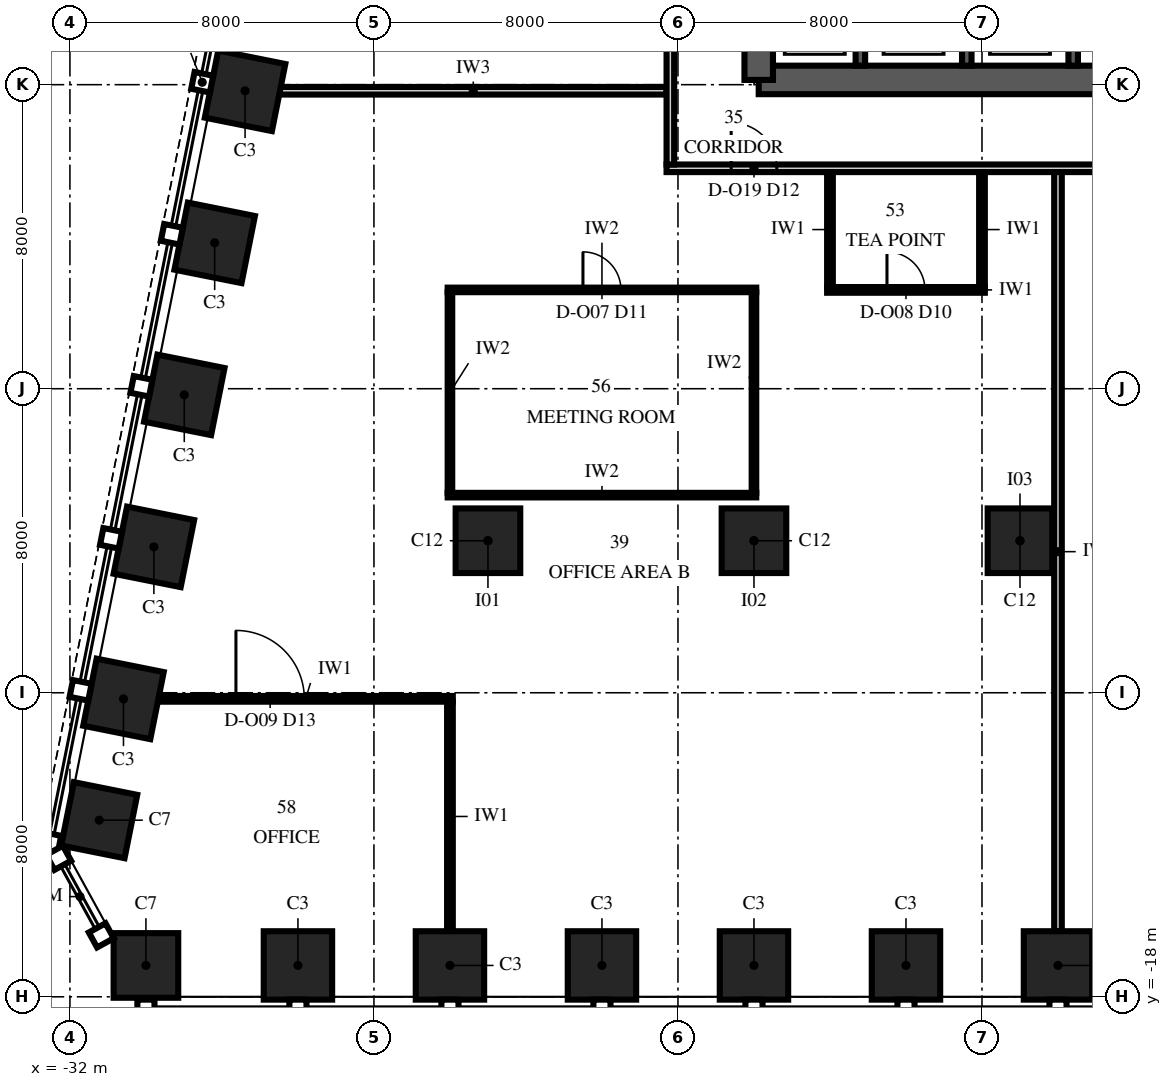
"""IFC4 building model, lengths in metres.
Left out: names, types, materials, properties, quantities, classifications, styles, units other than length and angle.
Written with IfcOpenShell. Run it as: python <this file> out.ifc"""

import sys

from ifc_helpers import new_model, si_unit, direction, frame, frame_2d, origin, origin_2d, place, context, subcontext, project, spatial, polyline, rectangle, outline, extrude, element, fill, save


model = new_model("IFC4")
c1 = context("Model", 3, precision=1e-05, world=origin(), true_north=direction((0.0, 1.0)))
c2 = subcontext(c1, "Body", "Model", "MODEL_VIEW")
j1 = project(units=[si_unit("LENGTHUNIT", "METRE"), si_unit("PLANEANGLEUNIT", "RADIAN")], contexts=[c1])
p1 = place(None, origin())
s1 = spatial("IfcSite", under=j1, at=p1, CompositionType="ELEMENT")
p2 = place(p1, origin())
s2 = spatial("IfcBuilding", under=s1, at=p2, CompositionType="ELEMENT")
p3 = place(p2, frame((0.0, 0.0, 151.0)))
s3 = spatial("IfcBuildingStorey", under=s2, at=p3, CompositionType="ELEMENT", Elevation=151.0)
p4 = place(p3, frame((-30.0, -17.175, 0.0), z_axis=(0.0, 0.0, 1.0), x_axis=(1.0, 0.0, 0.0)))
e1 = element("IfcColumn", 1, at=p4, inside=s3, PredefinedType="COLUMN", context=c2, shape_type="SweptSolid", body=[
    extrude(rectangle(XDim=1.7, YDim=1.7, at=origin_2d()), origin(), (0.0, 0.0, 1.0), 4.0),
])
for number, where, z_axis, x_axis in (
    (2, (-26.0, -17.175, 0.0), (0.0, 0.0, 1.0), (1.0, 0.0, 0.0)),
    (3, (-22.0, -17.175, 0.0), (0.0, 0.0, 1.0), (1.0, 0.0, 0.0)),
    (4, (-18.0, -17.175, 0.0), (0.0, 0.0, 1.0), (1.0, 0.0, 0.0)),
    (5, (-14.0, -17.175, 0.0), (0.0, 0.0, 1.0), (1.0, 0.0, 0.0)),
    (6, (-10.0, -17.175, 0.0), (0.0, 0.0, 1.0), (1.0, 0.0, 0.0)),
    (7, (-6.0, -17.175, 0.0), (0.0, 0.0, 1.0), (1.0, 0.0, 0.0)),
    (8, (-27.391, 5.838, 0.0), (0.0, 0.0, 1.0), (-0.196, -0.981, 0.0)),
    (9, (-28.191, 1.838, 0.0), (0.0, 0.0, 1.0), (-0.196, -0.981, 0.0)),
    (10, (-28.991, -2.162, 0.0), (0.0, 0.0, 1.0), (-0.196, -0.981, 0.0)),
    (11, (-29.791, -6.162, 0.0), (0.0, 0.0, 1.0), (-0.196, -0.981, 0.0)),
    (12, (-30.591, -10.162, 0.0), (0.0, 0.0, 1.0), (-0.196, -0.981, 0.0)),
):
    element("IfcColumn", number, at=place(p3, frame(where, z_axis=z_axis, x_axis=x_axis)), inside=s3, PredefinedType="COLUMN", context=c2, shape_type="SweptSolid", body=[
        extrude(rectangle(XDim=1.8, YDim=1.8, at=origin_2d()), origin(), (0.0, 0.0, 1.0), 4.0),
    ])
for number, where, z_axis, x_axis in (
    (13, (-31.229, -13.353, 0.0), (0.0, 0.0, 1.0), (-0.196, -0.981, 0.0)),
    (14, (-21.0, -6.0, 0.0), (0.0, 0.0, 1.0), (1.0, 0.0, 0.0)),
    (15, (-14.0, -6.0, 0.0), (0.0, 0.0, 1.0), (1.0, 0.0, 0.0)),
    (16, (-7.0, -6.0, 0.0), (0.0, 0.0, 1.0), (1.0, 0.0, 0.0)),
):
    element("IfcColumn", number, at=place(p3, frame(where, z_axis=z_axis, x_axis=x_axis)), inside=s3, PredefinedType="COLUMN", context=c2, shape_type="SweptSolid", body=[
        extrude(rectangle(XDim=1.7, YDim=1.7, at=origin_2d()), origin(), (0.0, 0.0, 1.0), 4.0),
    ])
p5 = place(p3, frame((-13.875, 6.125, 0.0), z_axis=(0.0, 0.0, 1.0), x_axis=(1.0, 0.0, 0.0)))
e17 = element("IfcWall", 17, at=p5, inside=s3, PredefinedType="SHEAR", context=c2, shape_type="SweptSolid", body=[
    extrude(rectangle(XDim=27.75, YDim=0.75, at=frame_2d((13.875, 0.0))), origin(), (0.0, 0.0, 1.0), 4.0),
])
p6 = place(p3, frame((-13.875, 23.875, 0.0), z_axis=(0.0, 0.0, 1.0), x_axis=(0.0, -1.0, 0.0)))
e18 = element("IfcWall", 18, at=p6, inside=s3, PredefinedType="SHEAR", context=c2, shape_type="SweptSolid", body=[
    extrude(outline(polyline([(0.0, -0.375), (17.75, -0.375), (17.75, 0.0), (17.375, 0.0), (17.375, 0.375), (0.375, 0.375), (0.375, 0.0), (0.0, 0.0), (0.0, -0.375)])), origin(), (0.0, 0.0, 1.0), 4.0),
])
p7 = place(p6, frame((11.775, 0.0, 0.0)))
e19 = element("IfcOpeningElement", 19, at=p7, cuts=e18, PredefinedType="OPENING", context=c2, shape_type="SweptSolid", body=[
    extrude(rectangle(XDim=1.8, YDim=2.4, at=frame_2d((0.9, 1.2))), frame((0.0, 0.39, 0.0), z_axis=(0.0, -1.0, 0.0), x_axis=(1.0, 0.0, 0.0)), (0.0, 0.0, 1.0), 0.78),
])
for number, where, z_axis, x_axis in (
    (20, (-11.2, 6.5, 0.0), (0.0, 0.0, 1.0), (0.0, 1.0, 0.0)),
    (21, (-8.4, 6.5, 0.0), (0.0, 0.0, 1.0), (0.0, 1.0, 0.0)),
    (22, (-5.6, 6.5, 0.0), (0.0, 0.0, 1.0), (0.0, 1.0, 0.0)),
):
    element("IfcWall", number, at=place(p3, frame(where, z_axis=z_axis, x_axis=x_axis)), inside=s3, PredefinedType="SHEAR", context=c2, shape_type="SweptSolid", body=[
        extrude(rectangle(XDim=2.775, YDim=0.25, at=frame_2d((1.387, 0.0))), origin(), (0.0, 0.0, 1.0), 4.0),
    ])
p8 = place(p3, frame((-29.673, -10.16, 0.0), z_axis=(0.0, 0.0, 1.0), x_axis=(1.0, 0.0, 0.0)))
e23 = element("IfcWall", 23, at=p8, inside=s3, PredefinedType="PARTITIONING", context=c2, shape_type="SweptSolid", body=[
    extrude(rectangle(XDim=7.748, YDim=0.15, at=frame_2d((3.874, 0.0))), origin(), (0.0, 0.0, 1.0), 3.25),
])
p9 = place(p8, frame((2.041, 0.0, 0.0)))
e24 = element("IfcOpeningElement", 24, at=p9, cuts=e23, PredefinedType="OPENING", context=c2, shape_type="SweptSolid", body=[
    extrude(rectangle(XDim=1.8, YDim=2.4, at=frame_2d((0.9, 1.2))), frame((0.0, 0.09, 0.0), z_axis=(0.0, -1.0, 0.0), x_axis=(1.0, 0.0, 0.0)), (0.0, 0.0, 1.0), 0.18),
])
p10 = place(p3, frame((-22.06, -4.8, 0.0), z_axis=(0.0, 0.0, 1.0), x_axis=(1.0, 0.0, 0.0)))
e25 = element("IfcWall", 25, at=p10, inside=s3, PredefinedType="PARTITIONING", context=c2, shape_type="SweptSolid", body=[
    extrude(rectangle(XDim=8.12, YDim=0.12, at=frame_2d((4.06, 0.0))), origin(), (0.0, 0.0, 1.0), 3.25),
])
p11 = place(p3, frame((-22.06, 0.6, 0.0), z_axis=(0.0, 0.0, 1.0), x_axis=(1.0, 0.0, 0.0)))
e26 = element("IfcWall", 26, at=p11, inside=s3, PredefinedType="PARTITIONING", context=c2, shape_type="SweptSolid", body=[
    extrude(rectangle(XDim=8.12, YDim=0.12, at=frame_2d((4.06, 0.0))), origin(), (0.0, 0.0, 1.0), 3.25),
])
p12 = place(p11, frame((3.56, 0.0, 0.0)))
e27 = element("IfcOpeningElement", 27, at=p12, cuts=e26, PredefinedType="OPENING", context=c2, shape_type="SweptSolid", body=[
    extrude(rectangle(XDim=1.0, YDim=2.4, at=frame_2d((0.5, 1.2))), frame((0.0, 0.075, 0.0), z_axis=(0.0, -1.0, 0.0), x_axis=(1.0, 0.0, 0.0)), (0.0, 0.0, 1.0), 0.15),
])
p13 = place(p3, frame((-12.075, 0.6, 0.0), z_axis=(0.0, 0.0, 1.0), x_axis=(1.0, 0.0, 0.0)))
e28 = element("IfcWall", 28, at=p13, inside=s3, PredefinedType="PARTITIONING", context=c2, shape_type="SweptSolid", body=[
    extrude(rectangle(XDim=4.15, YDim=0.15, at=frame_2d((2.075, 0.0))), origin(), (0.0, 0.0, 1.0), 3.25),
])
p14 = place(p13, frame((1.575, 0.0, 0.0)))
e29 = element("IfcOpeningElement", 29, at=p14, cuts=e28, PredefinedType="OPENING", context=c2, shape_type="SweptSolid", body=[
    extrude(rectangle(XDim=1.0, YDim=2.3, at=frame_2d((0.5, 1.15))), frame((0.0, 0.09, 0.0), z_axis=(0.0, -1.0, 0.0), x_axis=(1.0, 0.0, 0.0)), (0.0, 0.0, 1.0), 0.18),
])
p15 = place(p3, frame((-16.3, 3.8, 0.0), z_axis=(0.0, 0.0, 1.0), x_axis=(1.0, 0.0, 0.0)))
e30 = element("IfcWall", 30, at=p15, inside=s3, PredefinedType="PARTITIONING", context=c2, shape_type="SweptSolid", body=[
    extrude(rectangle(XDim=32.6, YDim=0.2, at=frame_2d((16.3, 0.0))), origin(), (0.0, 0.0, 1.0), 3.25),
])
p16 = place(p15, frame((1.7, 0.0, 0.0)))
e31 = element("IfcOpeningElement", 31, at=p16, cuts=e30, PredefinedType="OPENING", context=c2, shape_type="SweptSolid", body=[
    extrude(rectangle(XDim=1.2, YDim=2.4, at=frame_2d((0.6, 1.2))), frame((0.0, 0.115, 0.0), z_axis=(0.0, -1.0, 0.0), x_axis=(1.0, 0.0, 0.0)), (0.0, 0.0, 1.0), 0.23),
])
p17 = place(p15, frame((12.7, 0.0, 0.0)))
e32 = element("IfcOpeningElement", 32, at=p17, cuts=e30, PredefinedType="OPENING", context=c2, shape_type="SweptSolid", body=[
    extrude(rectangle(XDim=1.2, YDim=2.4, at=frame_2d((0.6, 1.2))), frame((0.0, 0.115, 0.0), z_axis=(0.0, -1.0, 0.0), x_axis=(1.0, 0.0, 0.0)), (0.0, 0.0, 1.0), 0.23),
])
p18 = place(p3, frame((-26.473, 5.84, 0.0), z_axis=(0.0, 0.0, 1.0), x_axis=(1.0, 0.0, 0.0)))
e33 = element("IfcWall", 33, at=p18, inside=s3, PredefinedType="PARTITIONING", context=c2, shape_type="SweptSolid", body=[
    extrude(rectangle(XDim=10.173, YDim=0.2, at=frame_2d((5.086, 0.0))), origin(), (0.0, 0.0, 1.0), 2.842),
])
p19 = place(p3, frame((-22.0, -16.275, 0.0), z_axis=(0.0, 0.0, 1.0), x_axis=(0.0, 1.0, 0.0)))
e34 = element("IfcWall", 34, at=p19, inside=s3, PredefinedType="PARTITIONING", context=c2, shape_type="SweptSolid", body=[
    extrude(rectangle(XDim=6.04, YDim=0.15, at=frame_2d((3.02, 0.0))), origin(), (0.0, 0.0, 1.0), 3.25),
])
p20 = place(p3, frame((-22.0, -4.74, 0.0), z_axis=(0.0, 0.0, 1.0), x_axis=(0.0, 1.0, 0.0)))
e35 = element("IfcWall", 35, at=p20, inside=s3, PredefinedType="PARTITIONING", context=c2, shape_type="SweptSolid", body=[
    extrude(rectangle(XDim=5.28, YDim=0.12, at=frame_2d((2.64, 0.0))), origin(), (0.0, 0.0, 1.0), 3.25),
])
p21 = place(p3, frame((-16.2, 3.9, 0.0), z_axis=(0.0, 0.0, 1.0), x_axis=(0.0, 1.0, 0.0)))
e36 = element("IfcWall", 36, at=p21, inside=s3, PredefinedType="PARTITIONING", context=c2, shape_type="SweptSolid", body=[
    extrude(rectangle(XDim=24.375, YDim=0.2, at=frame_2d((12.188, 0.0))), origin(), (0.0, 0.0, 1.0), 2.842),
])
p22 = place(p21, frame((7.5, 0.0, 0.0)))
e37 = element("IfcOpeningElement", 37, at=p22, cuts=e36, PredefinedType="OPENING", context=c2, shape_type="SweptSolid", body=[
    extrude(rectangle(XDim=1.2, YDim=2.4, at=frame_2d((0.6, 1.2))), frame((0.0, 0.115, 0.0), z_axis=(0.0, -1.0, 0.0), x_axis=(1.0, 0.0, 0.0)), (0.0, 0.0, 1.0), 0.23),
])
p23 = place(p3, frame((-14.0, -4.74, 0.0), z_axis=(0.0, 0.0, 1.0), x_axis=(0.0, 1.0, 0.0)))
e38 = element("IfcWall", 38, at=p23, inside=s3, PredefinedType="PARTITIONING", context=c2, shape_type="SweptSolid", body=[
    extrude(rectangle(XDim=5.28, YDim=0.12, at=frame_2d((2.64, 0.0))), origin(), (0.0, 0.0, 1.0), 3.25),
])
for number, where, z_axis, x_axis in (
    (39, (-12.0, 0.675, 0.0), (0.0, 0.0, 1.0), (0.0, 1.0, 0.0)),
    (40, (-8.0, 0.675, 0.0), (0.0, 0.0, 1.0), (0.0, 1.0, 0.0)),
):
    element("IfcWall", number, at=place(p3, frame(where, z_axis=z_axis, x_axis=x_axis)), inside=s3, PredefinedType="PARTITIONING", context=c2, shape_type="SweptSolid", body=[
        extrude(rectangle(XDim=3.025, YDim=0.15, at=frame_2d((1.512, 0.0))), origin(), (0.0, 0.0, 1.0), 3.85),
    ])
p24 = place(p3, frame((-6.0, -16.275, 0.0), z_axis=(0.0, 0.0, 1.0), x_axis=(0.0, 1.0, 0.0)))
e41 = element("IfcWall", 41, at=p24, inside=s3, PredefinedType="PARTITIONING", context=c2, shape_type="SweptSolid", body=[
    extrude(rectangle(XDim=19.975, YDim=0.2, at=frame_2d((9.987, 0.0))), origin(), (0.0, 0.0, 1.0), 2.842),
])
p25 = place(p12, origin())
e42 = element("IfcDoor", 42, at=p25, inside=s3, OperationType="SINGLE_SWING_RIGHT", PredefinedType="DOOR", context=c2, shape_type="SweptSolid", body=[
    extrude(rectangle(XDim=1.0, YDim=2.4, at=frame_2d((0.5, 1.2))), frame((0.0, 0.06, 0.0), z_axis=(0.0, -1.0, 0.0), x_axis=(1.0, 0.0, 0.0)), (0.0, 0.0, 1.0), 0.12),
])
fill(e27, e42)
p26 = place(p14, origin())
e43 = element("IfcDoor", 43, at=p26, inside=s3, OperationType="SINGLE_SWING_LEFT", PredefinedType="DOOR", context=c2, shape_type="SweptSolid", body=[
    extrude(rectangle(XDim=1.0, YDim=2.3, at=frame_2d((0.5, 1.15))), frame((0.0, 0.075, 0.0), z_axis=(0.0, -1.0, 0.0), x_axis=(1.0, 0.0, 0.0)), (0.0, 0.0, 1.0), 0.149),
])
fill(e29, e43)
p27 = place(p9, origin())
e44 = element("IfcDoor", 44, at=p27, inside=s3, OperationType="DOUBLE_DOOR_SINGLE_SWING", PredefinedType="DOOR", context=c2, shape_type="SweptSolid", body=[
    extrude(rectangle(XDim=1.8, YDim=2.4, at=frame_2d((0.9, 1.2))), frame((0.0, 0.075, 0.0), z_axis=(0.0, -1.0, 0.0), x_axis=(1.0, 0.0, 0.0)), (0.0, 0.0, 1.0), 0.149),
])
fill(e24, e44)
p28 = place(p16, origin())
e45 = element("IfcDoor", 45, at=p28, inside=s3, OperationType="SINGLE_SWING_LEFT", PredefinedType="DOOR", context=c2, shape_type="SweptSolid", body=[
    extrude(rectangle(XDim=1.2, YDim=2.4, at=frame_2d((0.6, 1.2))), frame((0.0, 0.1, 0.0), z_axis=(0.0, -1.0, 0.0), x_axis=(1.0, 0.0, 0.0)), (0.0, 0.0, 1.0), 0.199),
])
fill(e31, e45)
save(model, sys.argv[1])
